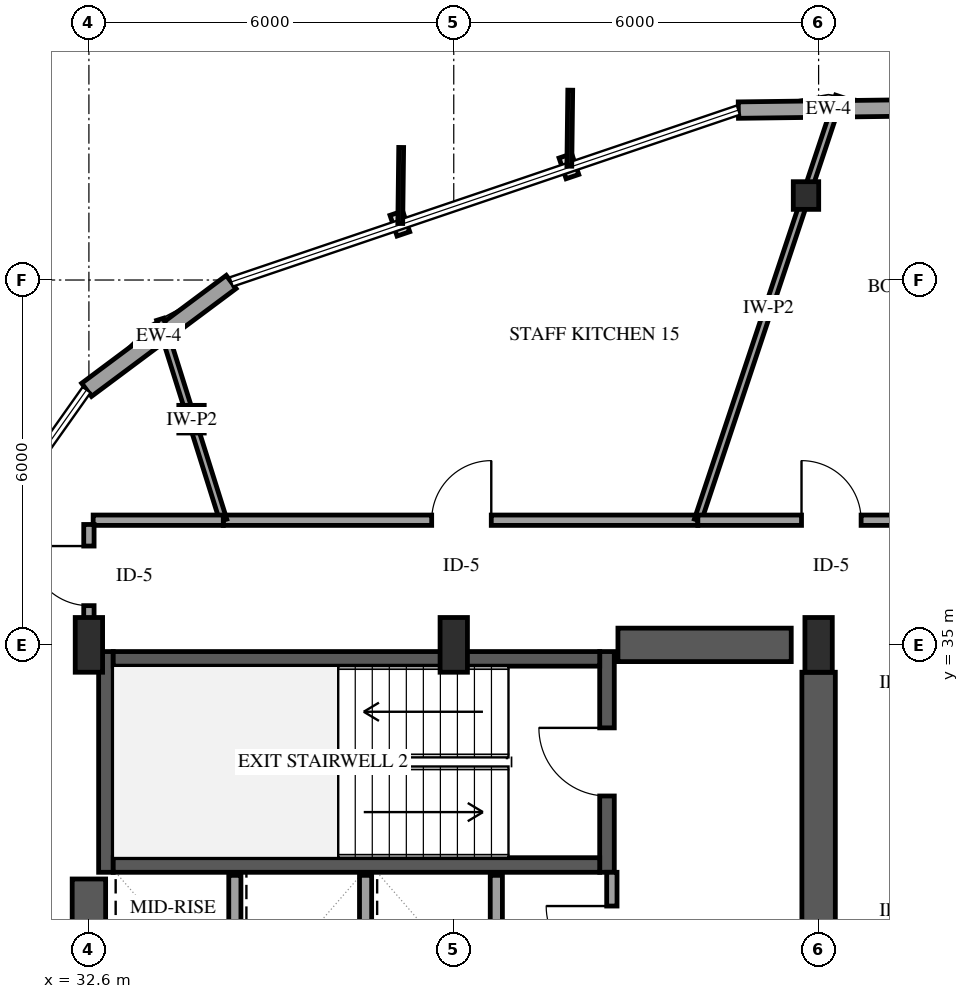
"""IFC4 building model, lengths in metres.
Left out: names, types, materials, properties, quantities, classifications, styles, units other than length and angle.
Written with IfcOpenShell. Run it as: python <this file> out.ifc"""

import sys

from ifc_helpers import new_model, si_unit, direction, frame, frame_2d, origin, origin_2d, place, context, subcontext, project, spatial, rectangle, i_section, extrude, element, fill, save


model = new_model("IFC4")
c1 = context("Model", 3, precision=1e-05, world=origin(), true_north=direction((0.0, 1.0)))
c2 = subcontext(c1, "Body", "Model", "MODEL_VIEW")
j1 = project(units=[si_unit("LENGTHUNIT", "METRE"), si_unit("PLANEANGLEUNIT", "RADIAN")], contexts=[c1])
p1 = place(None, origin())
s1 = spatial("IfcSite", under=j1, at=p1, CompositionType="ELEMENT")
p2 = place(p1, origin())
s2 = spatial("IfcBuilding", under=s1, at=p2, CompositionType="ELEMENT")
p3 = place(p2, frame((0.0, 0.0, 106.9)))
s3 = spatial("IfcBuildingStorey", under=s2, at=p3, CompositionType="ELEMENT", Elevation=106.9)
p4 = place(p3, frame((32.88, 31.26, 0.0), z_axis=(0.0, 0.0, 1.0), x_axis=(0.0, 1.0, 0.0)))
e1 = element("IfcWall", 1, at=p4, inside=s3, PredefinedType="SHEAR", context=c2, shape_type="SweptSolid", body=[
    extrude(rectangle(XDim=3.63, YDim=0.24, at=frame_2d((1.815, 0.0))), origin(), (0.0, 0.0, 1.0), 3.9),
])
p5 = place(p3, frame((41.12, 31.26, 0.0), z_axis=(0.0, 0.0, 1.0), x_axis=(0.0, 1.0, 0.0)))
e2 = element("IfcWall", 2, at=p5, inside=s3, PredefinedType="SHEAR", context=c2, shape_type="SweptSolid", body=[
    extrude(rectangle(XDim=3.63, YDim=0.24, at=frame_2d((1.815, 0.0))), origin(), (0.0, 0.0, 1.0), 3.9),
])
p6 = place(p5, frame((1.255, 0.0, 0.0)))
e3 = element("IfcOpeningElement", 3, at=p6, cuts=e2, PredefinedType="OPENING", context=c2, shape_type="SweptSolid", body=[
    extrude(rectangle(XDim=1.12, YDim=2.15, at=frame_2d((0.56, 1.075))), frame((0.0, 0.13, 0.0), z_axis=(0.0, -1.0, 0.0), x_axis=(1.0, 0.0, 0.0)), (0.0, 0.0, 1.0), 0.26),
])
for number, where, z_axis, x_axis in (
    (4, (33.0, 31.38, 0.0), (0.0, 0.0, 1.0), (1.0, 0.0, 0.0)),
    (5, (33.0, 34.77, 0.0), (0.0, 0.0, 1.0), (1.0, 0.0, 0.0)),
):
    element("IfcWall", number, at=place(p3, frame(where, z_axis=z_axis, x_axis=x_axis)), inside=s3, PredefinedType="SHEAR", context=c2, shape_type="SweptSolid", body=[
        extrude(rectangle(XDim=8.0, YDim=0.24, at=frame_2d((4.0, 0.0))), origin(), (0.0, 0.0, 1.0), 3.9),
    ])
p7 = place(p3, frame((32.6, 18.85, 0.0), z_axis=(0.0, 0.0, 1.0), x_axis=(0.0, 1.0, 0.0)))
e6 = element("IfcWall", 6, at=p7, inside=s3, PredefinedType="SHEAR", context=c2, shape_type="SweptSolid", body=[
    extrude(rectangle(XDim=12.3, YDim=0.55, at=frame_2d((6.15, 0.0))), origin(), (0.0, 0.0, 1.0), 3.9),
])
p8 = place(p3, frame((41.3, 35.0, 0.0), z_axis=(0.0, 0.0, 1.0), x_axis=(1.0, 0.0, 0.0)))
e7 = element("IfcWall", 7, at=p8, inside=s3, PredefinedType="SHEAR", context=c2, shape_type="SweptSolid", body=[
    extrude(rectangle(XDim=2.85, YDim=0.55, at=frame_2d((1.425, 0.0))), origin(), (0.0, 0.0, 1.0), 3.9),
])
p9 = place(p3, frame((44.6, 29.8, 0.0), z_axis=(0.0, 0.0, 1.0), x_axis=(0.0, 1.0, 0.0)))
e8 = element("IfcWall", 8, at=p9, inside=s3, PredefinedType="SHEAR", context=c2, shape_type="SweptSolid", body=[
    extrude(rectangle(XDim=4.75, YDim=0.55, at=frame_2d((2.375, 0.0))), origin(), (0.0, 0.0, 1.0), 3.9),
])
for number, where, z_axis, x_axis in (
    (9, (32.6, 35.0, 0.0), (0.0, 0.0, 1.0), (1.0, 0.0, 0.0)),
    (10, (38.6, 35.0, 0.0), (0.0, 0.0, 1.0), (1.0, 0.0, 0.0)),
    (11, (44.6, 35.0, 0.0), (0.0, 0.0, 1.0), (1.0, 0.0, 0.0)),
):
    element("IfcColumn", number, at=place(p3, frame(where, z_axis=z_axis, x_axis=x_axis)), inside=s3, PredefinedType="PILASTER", context=c2, shape_type="SweptSolid", body=[
        extrude(rectangle(XDim=0.45, YDim=0.9, at=origin_2d()), origin(), (0.0, 0.0, 1.0), 3.9),
    ])
for number, where, z_axis, x_axis in (
    (12, (44.393, 42.389, 0.0), (0.0, 0.0, 1.0), (1.0, 0.0, 0.0)),
    (13, (34.288, 38.711, 0.0), (0.0, 0.0, 1.0), (1.0, 0.0, 0.0)),
):
    element("IfcColumn", number, at=place(p3, frame(where, z_axis=z_axis, x_axis=x_axis)), inside=s3, PredefinedType="COLUMN", context=c2, shape_type="SweptSolid", body=[
        extrude(i_section(OverallWidth=0.418, OverallDepth=0.455, WebThickness=0.042, FlangeThickness=0.068, FilletRadius=0.038, at=origin_2d()), origin(), (0.0, 0.0, 1.0), 3.9),
    ])
for number, where, z_axis, x_axis in (
    (14, (46.247, 43.832, 0.0), (0.0, 0.0, 1.0), (-1.0, -0.013, 0.0)),
    (15, (34.94, 40.968, 0.0), (0.0, 0.0, 1.0), (-0.802, -0.598, 0.0)),
):
    element("IfcWall", number, at=place(p3, frame(where, z_axis=z_axis, x_axis=x_axis)), inside=s3, PredefinedType="SOLIDWALL", context=c2, shape_type="SweptSolid", body=[
        extrude(rectangle(XDim=2.966, YDim=0.27, at=frame_2d((1.483, 0.0))), origin(), (0.0, 0.0, 1.0), 2.979),
    ])
for number, where, z_axis, x_axis in (
    (16, (35.0, 29.11, 0.0), (0.0, 0.0, 1.0), (0.0, 1.0, 0.0)),
    (17, (37.15, 29.11, 0.0), (0.0, 0.0, 1.0), (0.0, 1.0, 0.0)),
    (18, (39.3, 29.11, 0.0), (0.0, 0.0, 1.0), (0.0, 1.0, 0.0)),
):
    element("IfcWall", number, at=place(p3, frame(where, z_axis=z_axis, x_axis=x_axis)), inside=s3, PredefinedType="SOLIDWALL", context=c2, shape_type="SweptSolid", body=[
        extrude(rectangle(XDim=2.1, YDim=0.2, at=frame_2d((1.05, 0.0))), origin(), (0.0, 0.0, 1.0), 3.6),
    ])
p10 = place(p3, frame((34.81, 37.05, 0.0), z_axis=(0.0, 0.0, 1.0), x_axis=(1.0, 0.0, 0.0)))
e19 = element("IfcWall", 19, at=p10, inside=s3, PredefinedType="PARTITIONING", context=c2, shape_type="SweptSolid", body=[
    extrude(rectangle(XDim=7.804, YDim=0.17, at=frame_2d((3.902, 0.0))), origin(), (0.0, 0.0, 1.0), 3.6),
])
p11 = place(p10, frame((3.427, 0.0, 0.0)))
e20 = element("IfcOpeningElement", 20, at=p11, cuts=e19, PredefinedType="OPENING", context=c2, shape_type="SweptSolid", body=[
    extrude(rectangle(XDim=0.98, YDim=2.15, at=frame_2d((0.49, 1.075))), frame((0.0, 0.095, 0.0), z_axis=(0.0, -1.0, 0.0), x_axis=(1.0, 0.0, 0.0)), (0.0, 0.0, 1.0), 0.19),
])
p12 = place(p3, frame((42.614, 37.05, 0.0), z_axis=(0.0, 0.0, 1.0), x_axis=(0.316108163988, 0.948723157017, 0.0)))
e21 = element("IfcWall", 21, at=p12, inside=s3, PredefinedType="PARTITIONING", context=c2, shape_type="SweptSolid", body=[
    extrude(rectangle(XDim=7.349, YDim=0.12, at=frame_2d((3.674, 0.0))), origin(), (0.0, 0.0, 1.0), 2.895),
])
p13 = place(p3, frame((42.614, 37.05, 0.0), z_axis=(0.0, 0.0, 1.0), x_axis=(1.0, 0.0, 0.0)))
e22 = element("IfcWall", 22, at=p13, inside=s3, PredefinedType="PARTITIONING", context=c2, shape_type="SweptSolid", body=[
    extrude(rectangle(XDim=4.36, YDim=0.17, at=frame_2d((2.18, 0.0))), origin(), (0.0, 0.0, 1.0), 3.6),
])
p14 = place(p13, frame((1.705, 0.0, 0.0)))
e23 = element("IfcOpeningElement", 23, at=p14, cuts=e22, PredefinedType="OPENING", context=c2, shape_type="SweptSolid", body=[
    extrude(rectangle(XDim=0.98, YDim=2.15, at=frame_2d((0.49, 1.075))), frame((0.0, 0.095, 0.0), z_axis=(0.0, -1.0, 0.0), x_axis=(1.0, 0.0, 0.0)), (0.0, 0.0, 1.0), 0.19),
])
p15 = place(p3, frame((34.81, 37.05, 0.0), z_axis=(0.0, 0.0, 1.0), x_axis=(-0.300004387009, 0.953937821755, 0.0)))
e24 = element("IfcWall", 24, at=p15, inside=s3, PredefinedType="PARTITIONING", context=c2, shape_type="SweptSolid", body=[
    extrude(rectangle(XDim=3.463, YDim=0.12, at=frame_2d((1.732, 0.0))), origin(), (0.0, 0.0, 1.0), 2.895),
])
p16 = place(p3, frame((41.2, 29.07, 0.0), z_axis=(0.0, 0.0, 1.0), x_axis=(0.0, 1.0, 0.0)))
e25 = element("IfcWall", 25, at=p16, inside=s3, PredefinedType="PARTITIONING", context=c2, shape_type="SweptSolid", body=[
    extrude(rectangle(XDim=2.19, YDim=0.17, at=frame_2d((1.095, 0.0))), origin(), (0.0, 0.0, 1.0), 3.6),
])
p17 = place(p16, frame((0.555, 0.0, 0.0)))
e26 = element("IfcOpeningElement", 26, at=p17, cuts=e25, PredefinedType="OPENING", context=c2, shape_type="SweptSolid", body=[
    extrude(rectangle(XDim=1.08, YDim=2.15, at=frame_2d((0.54, 1.075))), frame((0.0, 0.095, 0.0), z_axis=(0.0, -1.0, 0.0), x_axis=(1.0, 0.0, 0.0)), (0.0, 0.0, 1.0), 0.19),
])
p18 = place(p3, frame((32.67, 37.05, 0.0), z_axis=(0.0, 0.0, 1.0), x_axis=(1.0, 0.0, 0.0)))
e27 = element("IfcWall", 27, at=p18, inside=s3, PredefinedType="PARTITIONING", context=c2, shape_type="SweptSolid", body=[
    extrude(rectangle(XDim=2.14, YDim=0.17, at=frame_2d((1.07, 0.0))), origin(), (0.0, 0.0, 1.0), 3.6),
])
p19 = place(p3, frame((32.6, 35.07, 0.0), z_axis=(0.0, 0.0, 1.0), x_axis=(0.0, 1.0, 0.0)))
e28 = element("IfcWall", 28, at=p19, inside=s3, PredefinedType="PARTITIONING", context=c2, shape_type="SweptSolid", body=[
    extrude(rectangle(XDim=1.91, YDim=0.17, at=frame_2d((0.955, 0.0))), origin(), (0.0, 0.0, 1.0), 3.6),
])
p20 = place(p19, frame((0.575, 0.0, 0.0)))
e29 = element("IfcOpeningElement", 29, at=p20, cuts=e28, PredefinedType="OPENING", context=c2, shape_type="SweptSolid", body=[
    extrude(rectangle(XDim=0.98, YDim=2.15, at=frame_2d((0.49, 1.075))), frame((0.0, 0.095, 0.0), z_axis=(0.0, -1.0, 0.0), x_axis=(1.0, 0.0, 0.0)), (0.0, 0.0, 1.0), 0.19),
])
p21 = place(p6, origin())
e30 = element("IfcDoor", 30, at=p21, inside=s3, OperationType="SINGLE_SWING_RIGHT", PredefinedType="DOOR", context=c2, shape_type="SweptSolid", body=[
    extrude(rectangle(XDim=1.12, YDim=2.15, at=frame_2d((0.56, 1.075))), frame((0.0, 0.025, 0.0), z_axis=(0.0, -1.0, 0.0), x_axis=(1.0, 0.0, 0.0)), (0.0, 0.0, 1.0), 0.05),
])
fill(e3, e30)
p22 = place(p11, origin())
e31 = element("IfcDoor", 31, at=p22, inside=s3, OperationType="SINGLE_SWING_RIGHT", PredefinedType="DOOR", context=c2, shape_type="SweptSolid", body=[
    extrude(rectangle(XDim=0.98, YDim=2.15, at=frame_2d((0.49, 1.075))), frame((0.0, 0.025, 0.0), z_axis=(0.0, -1.0, 0.0), x_axis=(1.0, 0.0, 0.0)), (0.0, 0.0, 1.0), 0.05),
])
fill(e20, e31)
p23 = place(p14, origin())
e32 = element("IfcDoor", 32, at=p23, inside=s3, OperationType="SINGLE_SWING_LEFT", PredefinedType="DOOR", context=c2, shape_type="SweptSolid", body=[
    extrude(rectangle(XDim=0.98, YDim=2.15, at=frame_2d((0.49, 1.075))), frame((0.0, 0.025, 0.0), z_axis=(0.0, -1.0, 0.0), x_axis=(1.0, 0.0, 0.0)), (0.0, 0.0, 1.0), 0.05),
])
fill(e23, e32)
p24 = place(p17, origin())
e33 = element("IfcDoor", 33, at=p24, inside=s3, OperationType="SINGLE_SWING_RIGHT", PredefinedType="DOOR", context=c2, shape_type="SweptSolid", body=[
    extrude(rectangle(XDim=1.08, YDim=2.15, at=frame_2d((0.54, 1.075))), frame((0.0, 0.025, 0.0), z_axis=(0.0, -1.0, 0.0), x_axis=(1.0, 0.0, 0.0)), (0.0, 0.0, 1.0), 0.05),
])
fill(e26, e33)
p25 = place(p20, origin())
e34 = element("IfcDoor", 34, at=p25, inside=s3, OperationType="SINGLE_SWING_RIGHT", PredefinedType="DOOR", context=c2, shape_type="SweptSolid", body=[
    extrude(rectangle(XDim=0.98, YDim=2.15, at=frame_2d((0.49, 1.075))), frame((0.0, 0.025, 0.0), z_axis=(0.0, -1.0, 0.0), x_axis=(1.0, 0.0, 0.0)), (0.0, 0.0, 1.0), 0.05),
])
fill(e29, e34)
save(model, sys.argv[1])
